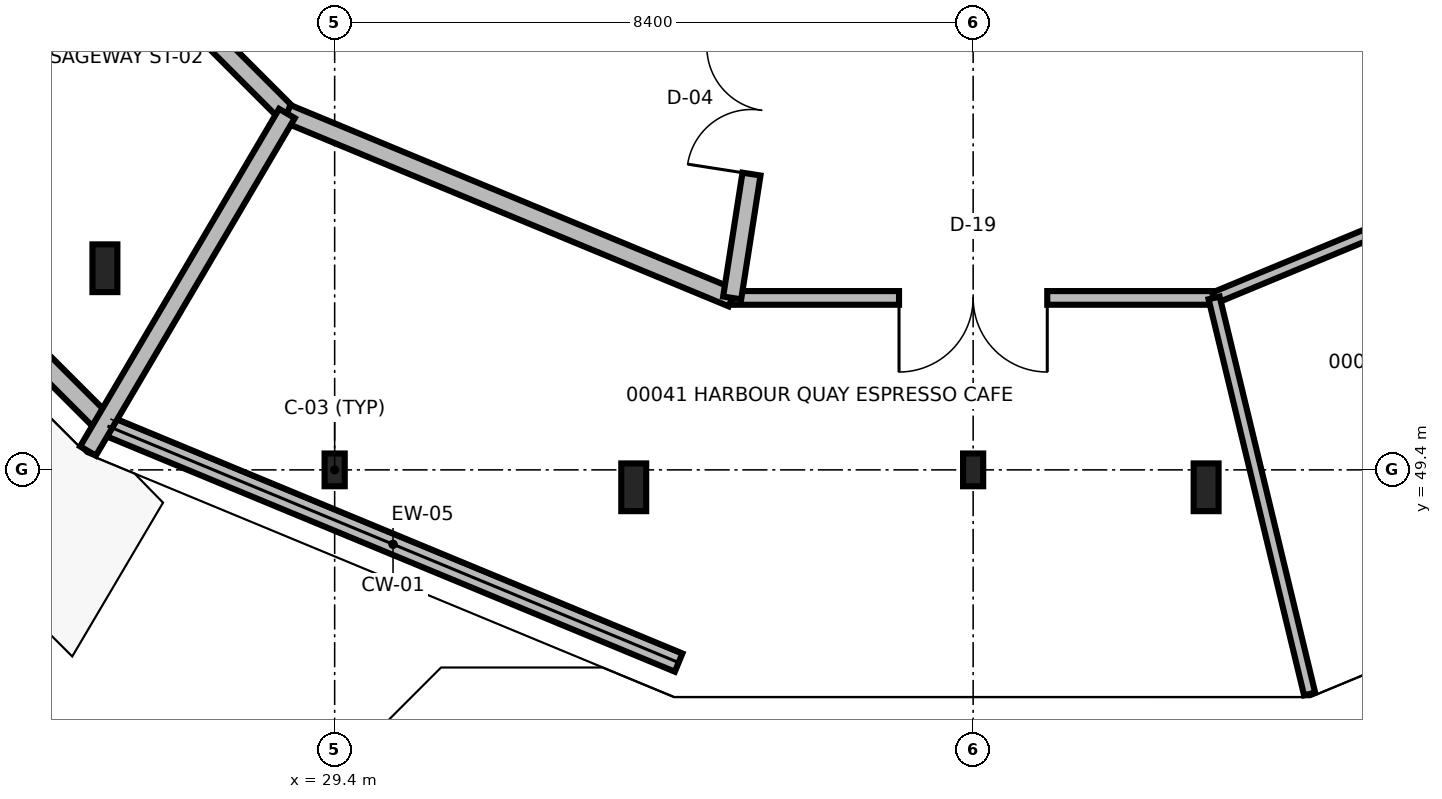
"""IFC4 building model, lengths in metres.
Left out: names, types, materials, properties, quantities, classifications, styles, units other than length and angle.
Written with IfcOpenShell. Run it as: python <this file> out.ifc"""

import sys

from ifc_helpers import new_model, si_unit, direction, frame, frame_2d, origin, origin_2d, place, context, subcontext, project, spatial, rectangle, i_section, extrude, element, fill, save


model = new_model("IFC4")
c1 = context("Model", 3, precision=1e-05, world=origin(), true_north=direction((0.0, 1.0)))
c2 = subcontext(c1, "Body", "Model", "MODEL_VIEW")
j1 = project(units=[si_unit("LENGTHUNIT", "METRE"), si_unit("PLANEANGLEUNIT", "RADIAN")], contexts=[c1])
p1 = place(None, origin())
s1 = spatial("IfcSite", under=j1, at=p1, CompositionType="ELEMENT")
p2 = place(p1, origin())
s2 = spatial("IfcBuilding", under=s1, at=p2, CompositionType="ELEMENT")
p3 = place(p2, origin())
s3 = spatial("IfcBuildingStorey", under=s2, at=p3, CompositionType="ELEMENT", Elevation=0.0)
for number, where, z_axis, x_axis in (
    (1, (26.377, 52.052, 0.0), (0.0, 0.0, 1.0), (1.0, 0.0, 0.0)),
    (2, (33.335, 49.171, 0.0), (0.0, 0.0, 1.0), (1.0, 0.0, 0.0)),
    (3, (40.865, 49.171, 0.0), (0.0, 0.0, 1.0), (1.0, 0.0, 0.0)),
):
    element("IfcColumn", number, at=place(p3, frame(where, z_axis=z_axis, x_axis=x_axis)), inside=s3, PredefinedType="COLUMN", context=c2, shape_type="SweptSolid", body=[
        extrude(i_section(OverallWidth=0.328, OverallDepth=0.628, WebThickness=0.017, FlangeThickness=0.028, at=origin_2d()), origin(), (0.0, 0.0, 1.0), 5.1),
    ])
for number, where, z_axis, x_axis in (
    (4, (29.4, 49.4, 0.0), (0.0, 0.0, 1.0), (1.0, 0.0, 0.0)),
    (5, (37.8, 49.4, 0.0), (0.0, 0.0, 1.0), (1.0, 0.0, 0.0)),
):
    element("IfcColumn", number, at=place(p3, frame(where, z_axis=z_axis, x_axis=x_axis)), inside=s3, PredefinedType="COLUMN", context=c2, shape_type="SweptSolid", body=[
        extrude(i_section(OverallWidth=0.265, OverallDepth=0.431, WebThickness=0.015, FlangeThickness=0.025, at=origin_2d()), origin(), (0.0, 0.0, 1.0), 5.1),
    ])
p4 = place(p3, frame((20.61, 55.762, 0.0), z_axis=(0.0, 0.0, 1.0), x_axis=(0.707106781187, -0.707106781187, 0.0)))
e6 = element("IfcWall", 6, at=p4, inside=s3, PredefinedType="SOLIDWALL", context=c2, shape_type="SweptSolid", body=[
    extrude(rectangle(XDim=8.134, YDim=0.26, at=frame_2d((4.067, 0.0))), origin(), (0.0, 0.0, 1.0), 3.845),
])
p5 = place(p4, frame((3.167, 0.0, 0.0)))
e7 = element("IfcOpeningElement", 7, at=p5, cuts=e6, PredefinedType="OPENING", context=c2, shape_type="SweptSolid", body=[
    extrude(rectangle(XDim=1.8, YDim=2.4, at=frame_2d((0.9, 1.2))), frame((0.0, 0.14, 0.0), z_axis=(0.0, -1.0, 0.0), x_axis=(1.0, 0.0, 0.0)), (0.0, 0.0, 1.0), 0.28),
])
p6 = place(p3, frame((26.411, 49.978, 0.0), z_axis=(0.0, 0.0, 1.0), x_axis=(0.923884768998, -0.382670790122, 0.0)))
e8 = element("IfcWall", 8, at=p6, inside=s3, PredefinedType="SOLIDWALL", context=c2, shape_type="SweptSolid", body=[
    extrude(rectangle(XDim=8.134, YDim=0.26, at=frame_2d((4.067, 0.0))), origin(), (0.0, 0.0, 1.0), 1.48),
])
p7 = place(p3, frame((24.289, 58.572, 0.0), z_axis=(0.0, 0.0, 1.0), x_axis=(0.707106781187, -0.707106781187, 0.0)))
e9 = element("IfcWall", 9, at=p7, inside=s3, PredefinedType="SOLIDWALL", context=c2, shape_type="SweptSolid", body=[
    extrude(rectangle(XDim=6.341, YDim=0.24, at=frame_2d((3.17, 0.0))), origin(), (0.0, 0.0, 1.0), 4.179),
])
p8 = place(p7, frame((2.32, 0.0, 0.0)))
e10 = element("IfcOpeningElement", 10, at=p8, cuts=e9, PredefinedType="OPENING", context=c2, shape_type="SweptSolid", body=[
    extrude(rectangle(XDim=1.7, YDim=2.25, at=frame_2d((0.85, 1.125))), frame((0.0, 0.13, 0.0), z_axis=(0.0, -1.0, 0.0), x_axis=(1.0, 0.0, 0.0)), (0.0, 0.0, 1.0), 0.26),
])
p9 = place(p3, frame((28.772, 54.089, 0.0), z_axis=(0.0, 0.0, 1.0), x_axis=(0.92387463456, -0.382695256851, 0.0)))
e11 = element("IfcWall", 11, at=p9, inside=s3, PredefinedType="SOLIDWALL", context=c2, shape_type="SweptSolid", body=[
    extrude(rectangle(XDim=6.341, YDim=0.24, at=frame_2d((3.17, 0.0))), origin(), (0.0, 0.0, 1.0), 4.179),
])
p10 = place(p3, frame((34.63, 51.662, 0.0), z_axis=(0.0, 0.0, 1.0), x_axis=(1.0, 0.0, 0.0)))
e12 = element("IfcWall", 12, at=p10, inside=s3, PredefinedType="PARTITIONING", context=c2, shape_type="SweptSolid", body=[
    extrude(rectangle(XDim=6.34, YDim=0.18, at=frame_2d((3.17, 0.0))), origin(), (0.0, 0.0, 1.0), 4.179),
])
p11 = place(p10, frame((2.195, 0.0, 0.0)))
e13 = element("IfcOpeningElement", 13, at=p11, cuts=e12, PredefinedType="OPENING", context=c2, shape_type="SweptSolid", body=[
    extrude(rectangle(XDim=1.95, YDim=2.35, at=frame_2d((0.975, 1.175))), frame((0.0, 0.1, 0.0), z_axis=(0.0, -1.0, 0.0), x_axis=(1.0, 0.0, 0.0)), (0.0, 0.0, 1.0), 0.2),
])
p12 = place(p3, frame((40.97, 51.662, 0.0), z_axis=(0.0, 0.0, 1.0), x_axis=(0.923868995071, 0.382708871005, 0.0)))
e14 = element("IfcWall", 14, at=p12, inside=s3, PredefinedType="PARTITIONING", context=c2, shape_type="SweptSolid", body=[
    extrude(rectangle(XDim=6.34, YDim=0.15, at=frame_2d((3.17, 0.0))), origin(), (0.0, 0.0, 1.0), 4.179),
])
p13 = place(p12, frame((2.395, 0.0, 0.0)))
e15 = element("IfcOpeningElement", 15, at=p13, cuts=e14, PredefinedType="OPENING", context=c2, shape_type="SweptSolid", body=[
    extrude(rectangle(XDim=1.55, YDim=2.3, at=frame_2d((0.775, 1.15))), frame((0.0, 0.085, 0.0), z_axis=(0.0, -1.0, 0.0), x_axis=(1.0, 0.0, 0.0)), (0.0, 0.0, 1.0), 0.17),
])
p14 = place(p3, frame((28.772, 54.089, 0.0), z_axis=(0.0, 0.0, 1.0), x_axis=(-0.507694819058, -0.861536981622, 0.0)))
e16 = element("IfcWall", 16, at=p14, inside=s3, PredefinedType="SOLIDWALL", context=c2, shape_type="SweptSolid", body=[
    extrude(rectangle(XDim=5.154, YDim=0.24, at=frame_2d((2.577, 0.0))), origin(), (0.0, 0.0, 1.0), 4.179),
])
p15 = place(p3, frame((40.97, 51.662, 0.0), z_axis=(0.0, 0.0, 1.0), x_axis=(0.234435715289, -0.972131624523, 0.0)))
e17 = element("IfcWall", 17, at=p15, inside=s3, PredefinedType="PARTITIONING", context=c2, shape_type="SweptSolid", body=[
    extrude(rectangle(XDim=5.36, YDim=0.15, at=frame_2d((2.68, 0.0))), origin(), (0.0, 0.0, 1.0), 4.179),
])
p16 = place(p3, frame((34.63, 51.662, 0.0), z_axis=(0.0, 0.0, 1.0), x_axis=(0.154075850756, 0.988059022637, 0.0)))
e18 = element("IfcWall", 18, at=p16, inside=s3, PredefinedType="SOLIDWALL", context=c2, shape_type="SweptSolid", body=[
    extrude(rectangle(XDim=4.998, YDim=0.24, at=frame_2d((2.499, 0.0))), origin(), (0.0, 0.0, 1.0), 4.179),
])
p17 = place(p16, frame((1.649, 0.0, 0.0)))
e19 = element("IfcOpeningElement", 19, at=p17, cuts=e18, PredefinedType="OPENING", context=c2, shape_type="SweptSolid", body=[
    extrude(rectangle(XDim=1.7, YDim=2.25, at=frame_2d((0.85, 1.125))), frame((0.0, 0.13, 0.0), z_axis=(0.0, -1.0, 0.0), x_axis=(1.0, 0.0, 0.0)), (0.0, 0.0, 1.0), 0.26),
])
p18 = place(p11, frame((1.95, 0.0, 0.0), z_axis=(0.0, 0.0, 1.0), x_axis=(-1.0, 0.0, 0.0)))
e20 = element("IfcDoor", 20, at=p18, inside=s3, OperationType="DOUBLE_DOOR_SINGLE_SWING", PredefinedType="DOOR", context=c2, shape_type="SweptSolid", body=[
    extrude(rectangle(XDim=1.95, YDim=2.35, at=frame_2d((0.975, 1.175))), frame((0.0, 0.025, 0.0), z_axis=(0.0, -1.0, 0.0), x_axis=(1.0, 0.0, 0.0)), (0.0, 0.0, 1.0), 0.05),
])
fill(e13, e20)
p19 = place(p17, origin())
e21 = element("IfcDoor", 21, at=p19, inside=s3, OperationType="DOUBLE_DOOR_SINGLE_SWING", PredefinedType="DOOR", context=c2, shape_type="SweptSolid", body=[
    extrude(rectangle(XDim=1.7, YDim=2.25, at=frame_2d((0.85, 1.125))), frame((0.0, 0.025, 0.0), z_axis=(0.0, -1.0, 0.0), x_axis=(1.0, 0.0, 0.0)), (0.0, 0.0, 1.0), 0.05),
])
fill(e19, e21)
save(model, sys.argv[1])
